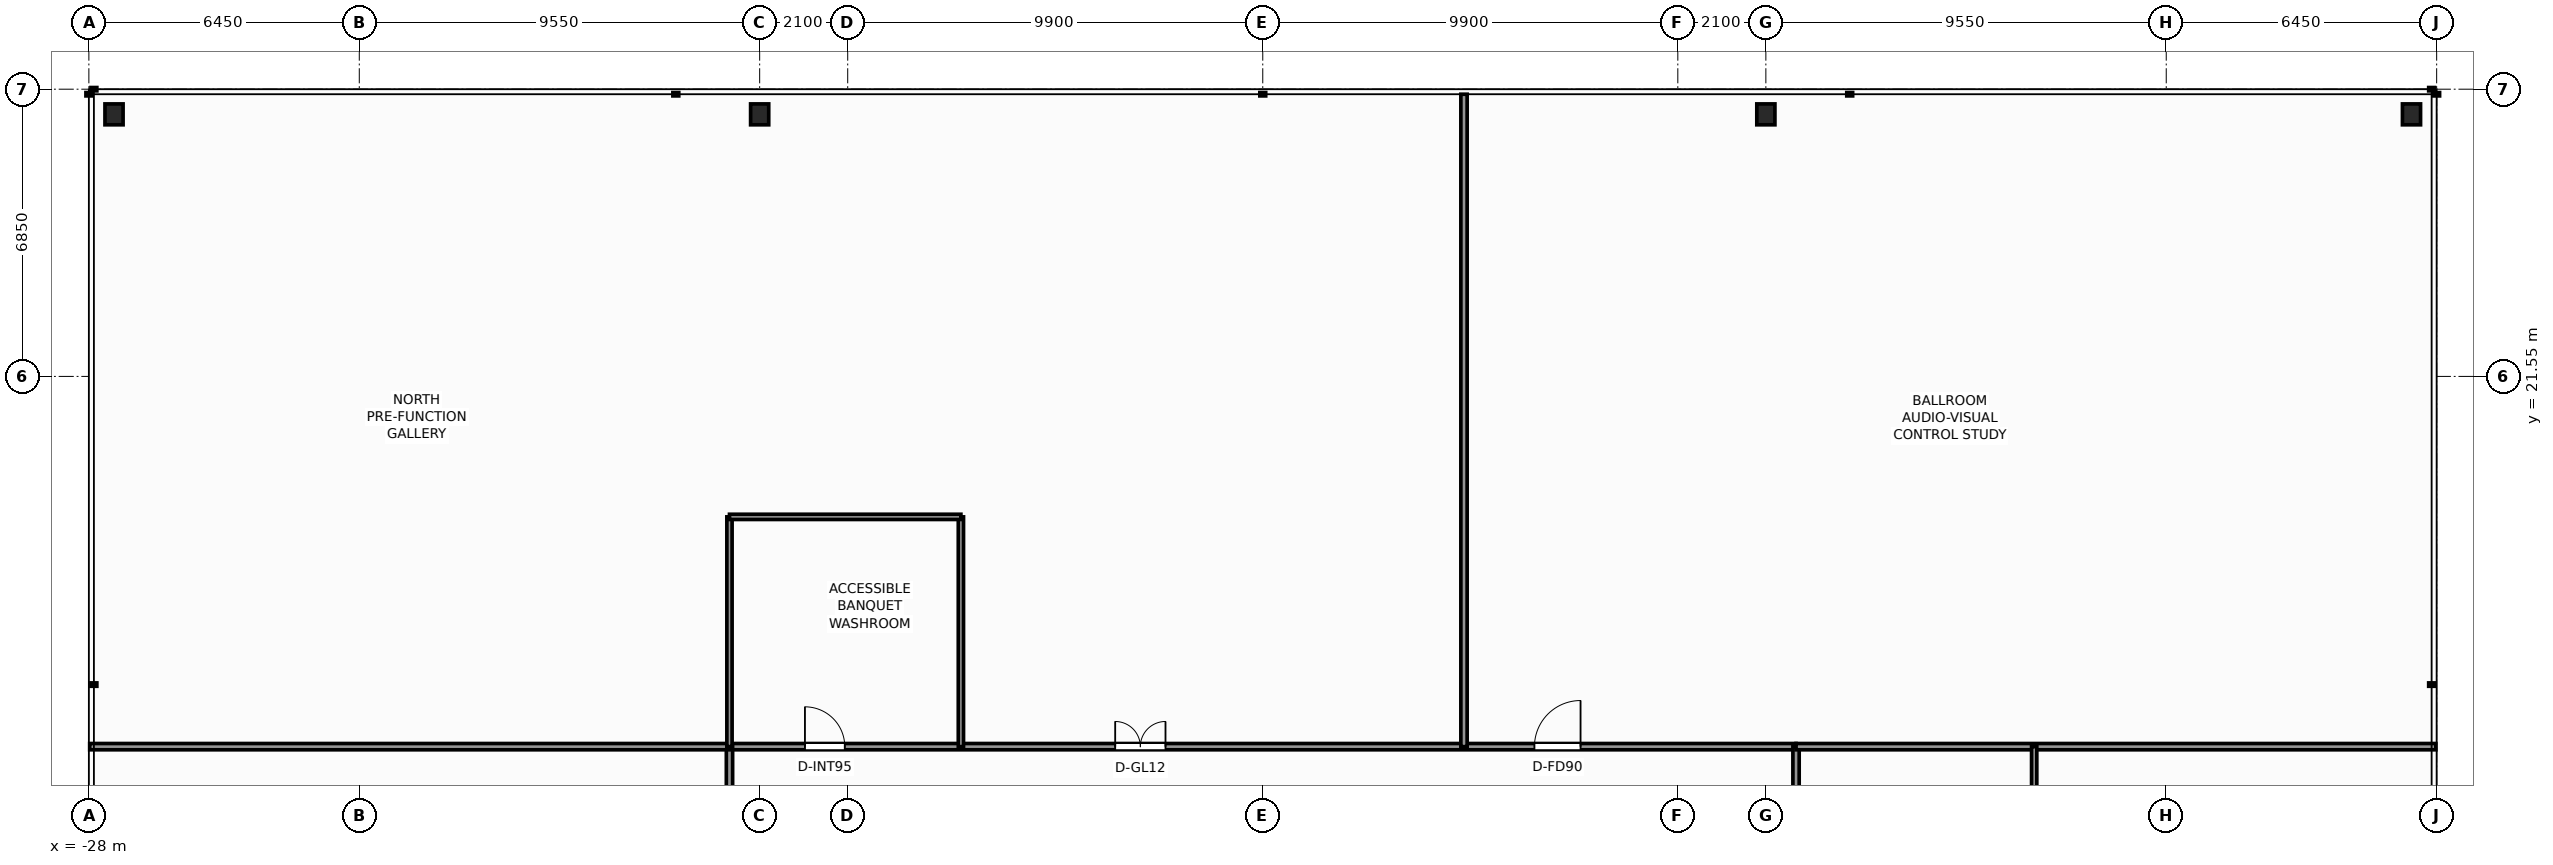
"""IFC4 building model, lengths in metres.
Left out: names, types, materials, properties, quantities, classifications, styles, units other than length and angle.
Written with IfcOpenShell. Run it as: python <this file> out.ifc"""

import sys

from ifc_helpers import new_model, si_unit, direction, frame, frame_2d, origin, origin_2d, place, context, subcontext, project, spatial, rectangle, i_section, extrude, element, fill, save


model = new_model("IFC4")
c1 = context("Model", 3, precision=1e-05, world=origin(), true_north=direction((0.0, 1.0)))
c2 = subcontext(c1, "Body", "Model", "MODEL_VIEW")
j1 = project(units=[si_unit("LENGTHUNIT", "METRE"), si_unit("PLANEANGLEUNIT", "RADIAN")], contexts=[c1])
p1 = place(None, origin())
s1 = spatial("IfcSite", under=j1, at=p1, CompositionType="ELEMENT")
p2 = place(p1, origin())
s2 = spatial("IfcBuilding", under=s1, at=p2, CompositionType="ELEMENT")
p3 = place(p2, frame((0.0, 0.0, 10.0)))
s3 = spatial("IfcBuildingStorey", under=s2, at=p3, CompositionType="ELEMENT", Elevation=10.0)
for number, where, z_axis, x_axis in (
    (1, (-27.4, 27.8, 0.0), (0.0, 0.0, 1.0), (1.0, 0.0, 0.0)),
    (2, (-12.0, 27.8, 0.0), (0.0, 0.0, 1.0), (1.0, 0.0, 0.0)),
    (3, (12.0, 27.8, 0.0), (0.0, 0.0, 1.0), (1.0, 0.0, 0.0)),
    (4, (27.4, 27.8, 0.0), (0.0, 0.0, 1.0), (1.0, 0.0, 0.0)),
):
    element("IfcColumn", number, at=place(p3, frame(where, z_axis=z_axis, x_axis=x_axis)), inside=s3, PredefinedType="COLUMN", context=c2, shape_type="SweptSolid", body=[
        extrude(i_section(OverallWidth=0.432, OverallDepth=0.498, WebThickness=0.056, FlangeThickness=0.089, FilletRadius=0.025, at=origin_2d()), origin(), (0.0, 0.0, 1.0), 5.2),
    ])
p4 = place(p3, frame((-12.72, 12.72, 0.0), z_axis=(0.0, 0.0, 1.0), x_axis=(1.0, 0.0, 0.0)))
e5 = element("IfcWall", 5, at=p4, inside=s3, PredefinedType="PARTITIONING", context=c2, shape_type="SweptSolid", body=[
    extrude(rectangle(XDim=25.44, YDim=0.15, at=frame_2d((12.72, 0.0))), origin(), (0.0, 0.0, 1.0), 3.894),
])
p5 = place(p4, frame((1.8, 0.0, 0.0)))
e6 = element("IfcOpeningElement", 6, at=p5, cuts=e5, PredefinedType="OPENING", context=c2, shape_type="SweptSolid", body=[
    extrude(rectangle(XDim=0.95, YDim=2.06, at=frame_2d((0.475, 1.03))), frame((0.0, 0.085, 0.0), z_axis=(0.0, -1.0, 0.0), x_axis=(1.0, 0.0, 0.0)), (0.0, 0.0, 1.0), 0.17),
])
p6 = place(p4, frame((9.2, 0.0, 0.0)))
e7 = element("IfcOpeningElement", 7, at=p6, cuts=e5, PredefinedType="OPENING", context=c2, shape_type="SweptSolid", body=[
    extrude(rectangle(XDim=1.2, YDim=2.2, at=frame_2d((0.6, 1.1))), frame((0.0, 0.085, 0.0), z_axis=(0.0, -1.0, 0.0), x_axis=(1.0, 0.0, 0.0)), (0.0, 0.0, 1.0), 0.17),
])
p7 = place(p4, frame((19.2, 0.0, 0.0)))
e8 = element("IfcOpeningElement", 8, at=p7, cuts=e5, PredefinedType="OPENING", context=c2, shape_type="SweptSolid", body=[
    extrude(rectangle(XDim=1.1, YDim=2.2, at=frame_2d((0.55, 1.1))), frame((0.0, 0.085, 0.0), z_axis=(0.0, -1.0, 0.0), x_axis=(1.0, 0.0, 0.0)), (0.0, 0.0, 1.0), 0.17),
])
p8 = place(p3, frame((-12.72, 1.72, 0.0), z_axis=(0.0, 0.0, 1.0), x_axis=(0.0, 1.0, 0.0)))
e9 = element("IfcWall", 9, at=p8, inside=s3, PredefinedType="PARTITIONING", context=c2, shape_type="SweptSolid", body=[
    extrude(rectangle(XDim=11.0, YDim=0.15, at=frame_2d((5.5, 0.0))), origin(), (0.0, 0.0, 1.0), 3.894),
])
p9 = place(p8, frame((3.5, 0.0, 0.0)))
e10 = element("IfcOpeningElement", 10, at=p9, cuts=e9, PredefinedType="OPENING", context=c2, shape_type="SweptSolid", body=[
    extrude(rectangle(XDim=1.6, YDim=2.3, at=frame_2d((0.8, 1.15))), frame((0.0, 0.085, 0.0), z_axis=(0.0, -1.0, 0.0), x_axis=(1.0, 0.0, 0.0)), (0.0, 0.0, 1.0), 0.17),
])
p10 = place(p3, frame((12.72, 1.72, 0.0), z_axis=(0.0, 0.0, 1.0), x_axis=(0.0, 1.0, 0.0)))
e11 = element("IfcWall", 11, at=p10, inside=s3, PredefinedType="PARTITIONING", context=c2, shape_type="SweptSolid", body=[
    extrude(rectangle(XDim=11.0, YDim=0.15, at=frame_2d((5.5, 0.0))), origin(), (0.0, 0.0, 1.0), 3.894),
])
p11 = place(p10, frame((1.8, 0.0, 0.0)))
e12 = element("IfcOpeningElement", 12, at=p11, cuts=e11, PredefinedType="OPENING", context=c2, shape_type="SweptSolid", body=[
    extrude(rectangle(XDim=0.95, YDim=2.06, at=frame_2d((0.475, 1.03))), frame((0.0, 0.085, 0.0), z_axis=(0.0, -1.0, 0.0), x_axis=(1.0, 0.0, 0.0)), (0.0, 0.0, 1.0), 0.17),
])
p12 = place(p10, frame((6.4, 0.0, 0.0)))
e13 = element("IfcOpeningElement", 13, at=p12, cuts=e11, PredefinedType="OPENING", context=c2, shape_type="SweptSolid", body=[
    extrude(rectangle(XDim=0.95, YDim=2.06, at=frame_2d((0.475, 1.03))), frame((0.0, 0.085, 0.0), z_axis=(0.0, -1.0, 0.0), x_axis=(1.0, 0.0, 0.0)), (0.0, 0.0, 1.0), 0.17),
])
for number, where, z_axis, x_axis in (
    (14, (-27.98, 12.72, 0.0), (0.0, 0.0, 1.0), (1.0, 0.0, 0.0)),
    (15, (12.72, 12.72, 0.0), (0.0, 0.0, 1.0), (1.0, 0.0, 0.0)),
):
    element("IfcWall", number, at=place(p3, frame(where, z_axis=z_axis, x_axis=x_axis)), inside=s3, PredefinedType="PARTITIONING", context=c2, shape_type="SweptSolid", body=[
        extrude(rectangle(XDim=15.26, YDim=0.15, at=frame_2d((7.63, 0.0))), origin(), (0.0, 0.0, 1.0), 4.289),
    ])
p13 = place(p3, frame((18.4, 6.8, 0.0), z_axis=(0.0, 0.0, 1.0), x_axis=(0.0, 1.0, 0.0)))
e16 = element("IfcWall", 16, at=p13, inside=s3, PredefinedType="PARTITIONING", context=c2, shape_type="SweptSolid", body=[
    extrude(rectangle(XDim=5.92, YDim=0.125, at=frame_2d((2.96, 0.0))), origin(), (0.0, 0.0, 1.0), 3.894),
])
p14 = place(p13, frame((1.4, 0.0, 0.0)))
e17 = element("IfcOpeningElement", 17, at=p14, cuts=e16, PredefinedType="OPENING", context=c2, shape_type="SweptSolid", body=[
    extrude(rectangle(XDim=0.9, YDim=2.06, at=frame_2d((0.45, 1.03))), frame((0.0, 0.073, 0.0), z_axis=(0.0, -1.0, 0.0), x_axis=(1.0, 0.0, 0.0)), (0.0, 0.0, 1.0), 0.145),
])
for number, where, z_axis, x_axis in (
    (18, (-12.72, 12.72, 0.0), (0.0, 0.0, 1.0), (0.0, 1.0, 0.0)),
    (19, (-7.2, 12.72, 0.0), (0.0, 0.0, 1.0), (0.0, 1.0, 0.0)),
):
    element("IfcWall", number, at=place(p3, frame(where, z_axis=z_axis, x_axis=x_axis)), inside=s3, PredefinedType="PARTITIONING", context=c2, shape_type="SweptSolid", body=[
        extrude(rectangle(XDim=5.48, YDim=0.125, at=frame_2d((2.74, 0.0))), origin(), (0.0, 0.0, 1.0), 4.92),
    ])
p15 = place(p3, frame((-12.72, 18.2, 0.0), z_axis=(0.0, 0.0, 1.0), x_axis=(1.0, 0.0, 0.0)))
e20 = element("IfcWall", 20, at=p15, inside=s3, PredefinedType="PARTITIONING", context=c2, shape_type="SweptSolid", body=[
    extrude(rectangle(XDim=5.52, YDim=0.125, at=frame_2d((2.76, 0.0))), origin(), (0.0, 0.0, 1.0), 3.894),
])
p16 = place(p3, frame((4.8, 12.72, 0.0), z_axis=(0.0, 0.0, 1.0), x_axis=(0.0, 1.0, 0.0)))
e21 = element("IfcWall", 21, at=p16, inside=s3, PredefinedType="PARTITIONING", context=c2, shape_type="SweptSolid", body=[
    extrude(rectangle(XDim=15.56, YDim=0.15, at=frame_2d((7.78, 0.0))), origin(), (0.0, 0.0, 1.0), 4.289),
])
p17 = place(p5, origin())
e22 = element("IfcDoor", 22, at=p17, inside=s3, OperationType="SINGLE_SWING_LEFT", PredefinedType="DOOR", context=c2, shape_type="SweptSolid", body=[
    extrude(rectangle(XDim=0.95, YDim=2.06, at=frame_2d((0.475, 1.03))), frame((0.0, 0.025, 0.0), z_axis=(0.0, -1.0, 0.0), x_axis=(1.0, 0.0, 0.0)), (0.0, 0.0, 1.0), 0.05),
])
fill(e6, e22)
p18 = place(p6, origin())
e23 = element("IfcDoor", 23, at=p18, inside=s3, OperationType="DOUBLE_DOOR_SINGLE_SWING", PredefinedType="DOOR", context=c2, shape_type="SweptSolid", body=[
    extrude(rectangle(XDim=1.2, YDim=2.2, at=frame_2d((0.6, 1.1))), frame((0.0, 0.025, 0.0), z_axis=(0.0, -1.0, 0.0), x_axis=(1.0, 0.0, 0.0)), (0.0, 0.0, 1.0), 0.05),
])
fill(e7, e23)
p19 = place(p7, origin())
e24 = element("IfcDoor", 24, at=p19, inside=s3, OperationType="SINGLE_SWING_RIGHT", PredefinedType="DOOR", context=c2, shape_type="SweptSolid", body=[
    extrude(rectangle(XDim=1.1, YDim=2.2, at=frame_2d((0.55, 1.1))), frame((0.0, 0.025, 0.0), z_axis=(0.0, -1.0, 0.0), x_axis=(1.0, 0.0, 0.0)), (0.0, 0.0, 1.0), 0.05),
])
fill(e8, e24)
save(model, sys.argv[1])
